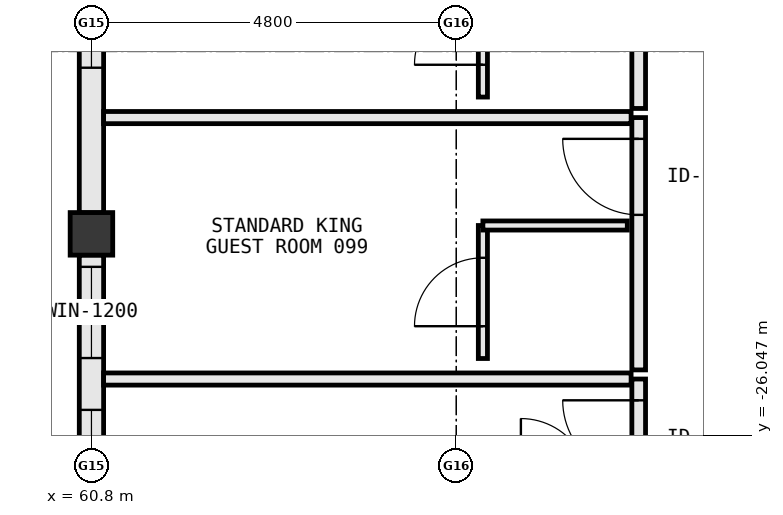
"""IFC4 building model, lengths in metres.
Left out: names, types, materials, properties, quantities, classifications, styles, units other than length and angle.
Written with IfcOpenShell. Run it as: python <this file> out.ifc"""

import sys

from ifc_helpers import new_model, si_unit, direction, frame, frame_2d, origin, origin_2d, place, context, subcontext, project, spatial, rectangle, extrude, element, fill, save


model = new_model("IFC4")
c1 = context("Model", 3, precision=1e-05, world=origin(), true_north=direction((0.0, 1.0)))
c2 = subcontext(c1, "Body", "Model", "MODEL_VIEW")
j1 = project(units=[si_unit("LENGTHUNIT", "METRE"), si_unit("PLANEANGLEUNIT", "RADIAN")], contexts=[c1])
p1 = place(None, origin())
s1 = spatial("IfcSite", under=j1, at=p1, CompositionType="ELEMENT")
p2 = place(p1, origin())
s2 = spatial("IfcBuilding", under=s1, at=p2, CompositionType="ELEMENT")
p3 = place(p2, frame((0.0, 0.0, 20.0)))
s3 = spatial("IfcBuildingStorey", under=s2, at=p3, CompositionType="ELEMENT", Elevation=20.0)
p4 = place(p3, frame((60.8, -23.4, 0.0), z_axis=(0.0, 0.0, 1.0), x_axis=(1.0, 0.0, 0.0)))
e1 = element("IfcColumn", 1, at=p4, inside=s3, PredefinedType="COLUMN", context=c2, shape_type="SweptSolid", body=[
    extrude(rectangle(XDim=0.56, YDim=0.56, at=origin_2d()), origin(), (0.0, 0.0, 1.0), 3.8),
])
p5 = place(p3, frame((60.8, -18.878, 0.0), z_axis=(0.0, 0.0, 1.0), x_axis=(0.0, -1.0, 0.0)))
e2 = element("IfcWall", 2, at=p5, inside=s3, PredefinedType="STANDARD", context=c2, shape_type="SweptSolid", body=[
    extrude(rectangle(XDim=4.244, YDim=0.32, at=frame_2d((2.122, 0.0))), origin(), (0.0, 0.0, 1.0), 3.005),
])
p6 = place(p5, frame((0.536, 0.0, 0.85)))
e3 = element("IfcOpeningElement", 3, at=p6, cuts=e2, PredefinedType="OPENING", context=c2, shape_type="SweptSolid", body=[
    extrude(rectangle(XDim=1.8, YDim=1.85, at=frame_2d((0.9, 0.925))), frame((0.0, 0.172, 0.0), z_axis=(0.0, -1.0, 0.0), x_axis=(1.0, 0.0, 0.0)), (0.0, 0.0, 1.0), 0.344),
])
p7 = place(p3, frame((60.8, -23.678, 0.0), z_axis=(0.0, 0.0, 1.0), x_axis=(0.0, -1.0, 0.0)))
e4 = element("IfcWall", 4, at=p7, inside=s3, PredefinedType="STANDARD", context=c2, shape_type="SweptSolid", body=[
    extrude(rectangle(XDim=4.244, YDim=0.32, at=frame_2d((2.122, 0.0))), origin(), (0.0, 0.0, 1.0), 3.005),
])
p8 = place(p7, frame((2.038, 0.0, 0.85)))
e5 = element("IfcOpeningElement", 5, at=p8, cuts=e4, PredefinedType="OPENING", context=c2, shape_type="SweptSolid", body=[
    extrude(rectangle(XDim=1.8, YDim=1.85, at=frame_2d((0.9, 0.925))), frame((0.0, 0.172, 0.0), z_axis=(0.0, -1.0, 0.0), x_axis=(1.0, 0.0, 0.0)), (0.0, 0.0, 1.0), 0.344),
])
p9 = place(p7, frame((0.156, 0.0, 0.85)))
e6 = element("IfcOpeningElement", 6, at=p9, cuts=e4, PredefinedType="OPENING", context=c2, shape_type="SweptSolid", body=[
    extrude(rectangle(XDim=1.2, YDim=1.55, at=frame_2d((0.6, 0.775))), frame((0.0, 0.172, 0.0), z_axis=(0.0, -1.0, 0.0), x_axis=(1.0, 0.0, 0.0)), (0.0, 0.0, 1.0), 0.344),
])
p10 = place(p3, frame((68.0, -28.63, 0.0), z_axis=(0.0, 0.0, 1.0), x_axis=(0.0, 1.0, 0.0)))
e7 = element("IfcWall", 7, at=p10, inside=s3, PredefinedType="PARTITIONING", context=c2, shape_type="SweptSolid", body=[
    extrude(rectangle(XDim=3.32, YDim=0.18, at=frame_2d((1.66, 0.0))), origin(), (0.0, 0.0, 1.0), 3.55),
])
p11 = place(p10, frame((2.04, 0.0, 0.0)))
e8 = element("IfcOpeningElement", 8, at=p11, cuts=e7, PredefinedType="OPENING", context=c2, shape_type="SweptSolid", body=[
    extrude(rectangle(XDim=1.0, YDim=2.2, at=frame_2d((0.5, 1.1))), frame((0.0, 0.102, 0.0), z_axis=(0.0, -1.0, 0.0), x_axis=(1.0, 0.0, 0.0)), (0.0, 0.0, 1.0), 0.204),
])
p12 = place(p3, frame((60.96, -25.31, 0.0), z_axis=(0.0, 0.0, 1.0), x_axis=(1.0, 0.0, 0.0)))
e9 = element("IfcWall", 9, at=p12, inside=s3, PredefinedType="PARTITIONING", context=c2, shape_type="SweptSolid", body=[
    extrude(rectangle(XDim=6.94, YDim=0.16, at=frame_2d((3.47, 0.0))), origin(), (0.0, 0.0, 1.0), 3.55),
])
p13 = place(p3, frame((68.0, -25.19, 0.0), z_axis=(0.0, 0.0, 1.0), x_axis=(0.0, 1.0, 0.0)))
e10 = element("IfcWall", 10, at=p13, inside=s3, PredefinedType="PARTITIONING", context=c2, shape_type="SweptSolid", body=[
    extrude(rectangle(XDim=3.32, YDim=0.18, at=frame_2d((1.66, 0.0))), origin(), (0.0, 0.0, 1.0), 3.55),
])
p14 = place(p13, frame((2.04, 0.0, 0.0)))
e11 = element("IfcOpeningElement", 11, at=p14, cuts=e10, PredefinedType="OPENING", context=c2, shape_type="SweptSolid", body=[
    extrude(rectangle(XDim=1.0, YDim=2.2, at=frame_2d((0.5, 1.1))), frame((0.0, 0.102, 0.0), z_axis=(0.0, -1.0, 0.0), x_axis=(1.0, 0.0, 0.0)), (0.0, 0.0, 1.0), 0.204),
])
p15 = place(p3, frame((60.96, -21.87, 0.0), z_axis=(0.0, 0.0, 1.0), x_axis=(1.0, 0.0, 0.0)))
e12 = element("IfcWall", 12, at=p15, inside=s3, PredefinedType="PARTITIONING", context=c2, shape_type="SweptSolid", body=[
    extrude(rectangle(XDim=6.94, YDim=0.16, at=frame_2d((3.47, 0.0))), origin(), (0.0, 0.0, 1.0), 3.55),
])
p16 = place(p3, frame((65.95, -25.04, 0.0), z_axis=(0.0, 0.0, 1.0), x_axis=(0.0, 1.0, 0.0)))
e13 = element("IfcWall", 13, at=p16, inside=s3, PredefinedType="PARTITIONING", context=c2, shape_type="SweptSolid", body=[
    extrude(rectangle(XDim=1.75, YDim=0.12, at=frame_2d((0.875, 0.0))), origin(), (0.0, 0.0, 1.0), 2.905),
])
p17 = place(p16, frame((0.425, 0.0, 0.0)))
e14 = element("IfcOpeningElement", 14, at=p17, cuts=e13, PredefinedType="OPENING", context=c2, shape_type="SweptSolid", body=[
    extrude(rectangle(XDim=0.9, YDim=2.15, at=frame_2d((0.45, 1.075))), frame((0.0, 0.072, 0.0), z_axis=(0.0, -1.0, 0.0), x_axis=(1.0, 0.0, 0.0)), (0.0, 0.0, 1.0), 0.144),
])
p18 = place(p3, frame((65.95, -23.29, 0.0), z_axis=(0.0, 0.0, 1.0), x_axis=(1.0, 0.0, 0.0)))
e15 = element("IfcWall", 15, at=p18, inside=s3, PredefinedType="PARTITIONING", context=c2, shape_type="SweptSolid", body=[
    extrude(rectangle(XDim=1.9, YDim=0.12, at=frame_2d((0.95, 0.0))), origin(), (0.0, 0.0, 1.0), 2.685),
])
p19 = place(p3, frame((68.0, -21.75, 0.0), z_axis=(0.0, 0.0, 1.0), x_axis=(0.0, 1.0, 0.0)))
e16 = element("IfcWall", 16, at=p19, inside=s3, PredefinedType="PARTITIONING", context=c2, shape_type="SweptSolid", body=[
    extrude(rectangle(XDim=3.32, YDim=0.18, at=frame_2d((1.66, 0.0))), origin(), (0.0, 0.0, 1.0), 3.55),
])
p20 = place(p19, frame((2.04, 0.0, 0.0)))
e17 = element("IfcOpeningElement", 17, at=p20, cuts=e16, PredefinedType="OPENING", context=c2, shape_type="SweptSolid", body=[
    extrude(rectangle(XDim=1.0, YDim=2.2, at=frame_2d((0.5, 1.1))), frame((0.0, 0.102, 0.0), z_axis=(0.0, -1.0, 0.0), x_axis=(1.0, 0.0, 0.0)), (0.0, 0.0, 1.0), 0.204),
])
p21 = place(p3, frame((65.95, -21.6, 0.0), z_axis=(0.0, 0.0, 1.0), x_axis=(0.0, 1.0, 0.0)))
e18 = element("IfcWall", 18, at=p21, inside=s3, PredefinedType="PARTITIONING", context=c2, shape_type="SweptSolid", body=[
    extrude(rectangle(XDim=1.75, YDim=0.12, at=frame_2d((0.875, 0.0))), origin(), (0.0, 0.0, 1.0), 2.905),
])
p22 = place(p21, frame((0.425, 0.0, 0.0)))
e19 = element("IfcOpeningElement", 19, at=p22, cuts=e18, PredefinedType="OPENING", context=c2, shape_type="SweptSolid", body=[
    extrude(rectangle(XDim=0.9, YDim=2.15, at=frame_2d((0.45, 1.075))), frame((0.0, 0.072, 0.0), z_axis=(0.0, -1.0, 0.0), x_axis=(1.0, 0.0, 0.0)), (0.0, 0.0, 1.0), 0.144),
])
p23 = place(p8, origin())
e20 = element("IfcWindow", 20, at=p23, inside=s3, PartitioningType="SINGLE_PANEL", PredefinedType="WINDOW", context=c2, shape_type="SweptSolid", body=[
    extrude(rectangle(XDim=1.8, YDim=1.85, at=frame_2d((0.9, 0.925))), frame((0.0, 0.03, 0.0), z_axis=(0.0, -1.0, 0.0), x_axis=(1.0, 0.0, 0.0)), (0.0, 0.0, 1.0), 0.06),
])
fill(e5, e20)
p24 = place(p9, origin())
e21 = element("IfcWindow", 21, at=p24, inside=s3, PartitioningType="SINGLE_PANEL", PredefinedType="WINDOW", context=c2, shape_type="SweptSolid", body=[
    extrude(rectangle(XDim=1.2, YDim=1.55, at=frame_2d((0.6, 0.775))), frame((0.0, 0.03, 0.0), z_axis=(0.0, -1.0, 0.0), x_axis=(1.0, 0.0, 0.0)), (0.0, 0.0, 1.0), 0.06),
])
fill(e6, e21)
p25 = place(p6, origin())
e22 = element("IfcWindow", 22, at=p25, inside=s3, PartitioningType="SINGLE_PANEL", PredefinedType="WINDOW", context=c2, shape_type="SweptSolid", body=[
    extrude(rectangle(XDim=1.8, YDim=1.85, at=frame_2d((0.9, 0.925))), frame((0.0, 0.03, 0.0), z_axis=(0.0, -1.0, 0.0), x_axis=(1.0, 0.0, 0.0)), (0.0, 0.0, 1.0), 0.06),
])
fill(e3, e22)
p26 = place(p11, origin())
e23 = element("IfcDoor", 23, at=p26, inside=s3, OperationType="SINGLE_SWING_RIGHT", PredefinedType="DOOR", context=c2, shape_type="SweptSolid", body=[
    extrude(rectangle(XDim=1.0, YDim=2.2, at=frame_2d((0.5, 1.1))), frame((0.0, 0.025, 0.0), z_axis=(0.0, -1.0, 0.0), x_axis=(1.0, 0.0, 0.0)), (0.0, 0.0, 1.0), 0.05),
])
fill(e8, e23)
p27 = place(p14, origin())
e24 = element("IfcDoor", 24, at=p27, inside=s3, OperationType="SINGLE_SWING_RIGHT", PredefinedType="DOOR", context=c2, shape_type="SweptSolid", body=[
    extrude(rectangle(XDim=1.0, YDim=2.2, at=frame_2d((0.5, 1.1))), frame((0.0, 0.025, 0.0), z_axis=(0.0, -1.0, 0.0), x_axis=(1.0, 0.0, 0.0)), (0.0, 0.0, 1.0), 0.05),
])
fill(e11, e24)
p28 = place(p17, origin())
e25 = element("IfcDoor", 25, at=p28, inside=s3, OperationType="SINGLE_SWING_LEFT", PredefinedType="DOOR", context=c2, shape_type="SweptSolid", body=[
    extrude(rectangle(XDim=0.9, YDim=2.15, at=frame_2d((0.45, 1.075))), frame((0.0, 0.025, 0.0), z_axis=(0.0, -1.0, 0.0), x_axis=(1.0, 0.0, 0.0)), (0.0, 0.0, 1.0), 0.05),
])
fill(e14, e25)
p29 = place(p22, origin())
e26 = element("IfcDoor", 26, at=p29, inside=s3, OperationType="SINGLE_SWING_LEFT", PredefinedType="DOOR", context=c2, shape_type="SweptSolid", body=[
    extrude(rectangle(XDim=0.9, YDim=2.15, at=frame_2d((0.45, 1.075))), frame((0.0, 0.025, 0.0), z_axis=(0.0, -1.0, 0.0), x_axis=(1.0, 0.0, 0.0)), (0.0, 0.0, 1.0), 0.05),
])
fill(e19, e26)
save(model, sys.argv[1])
